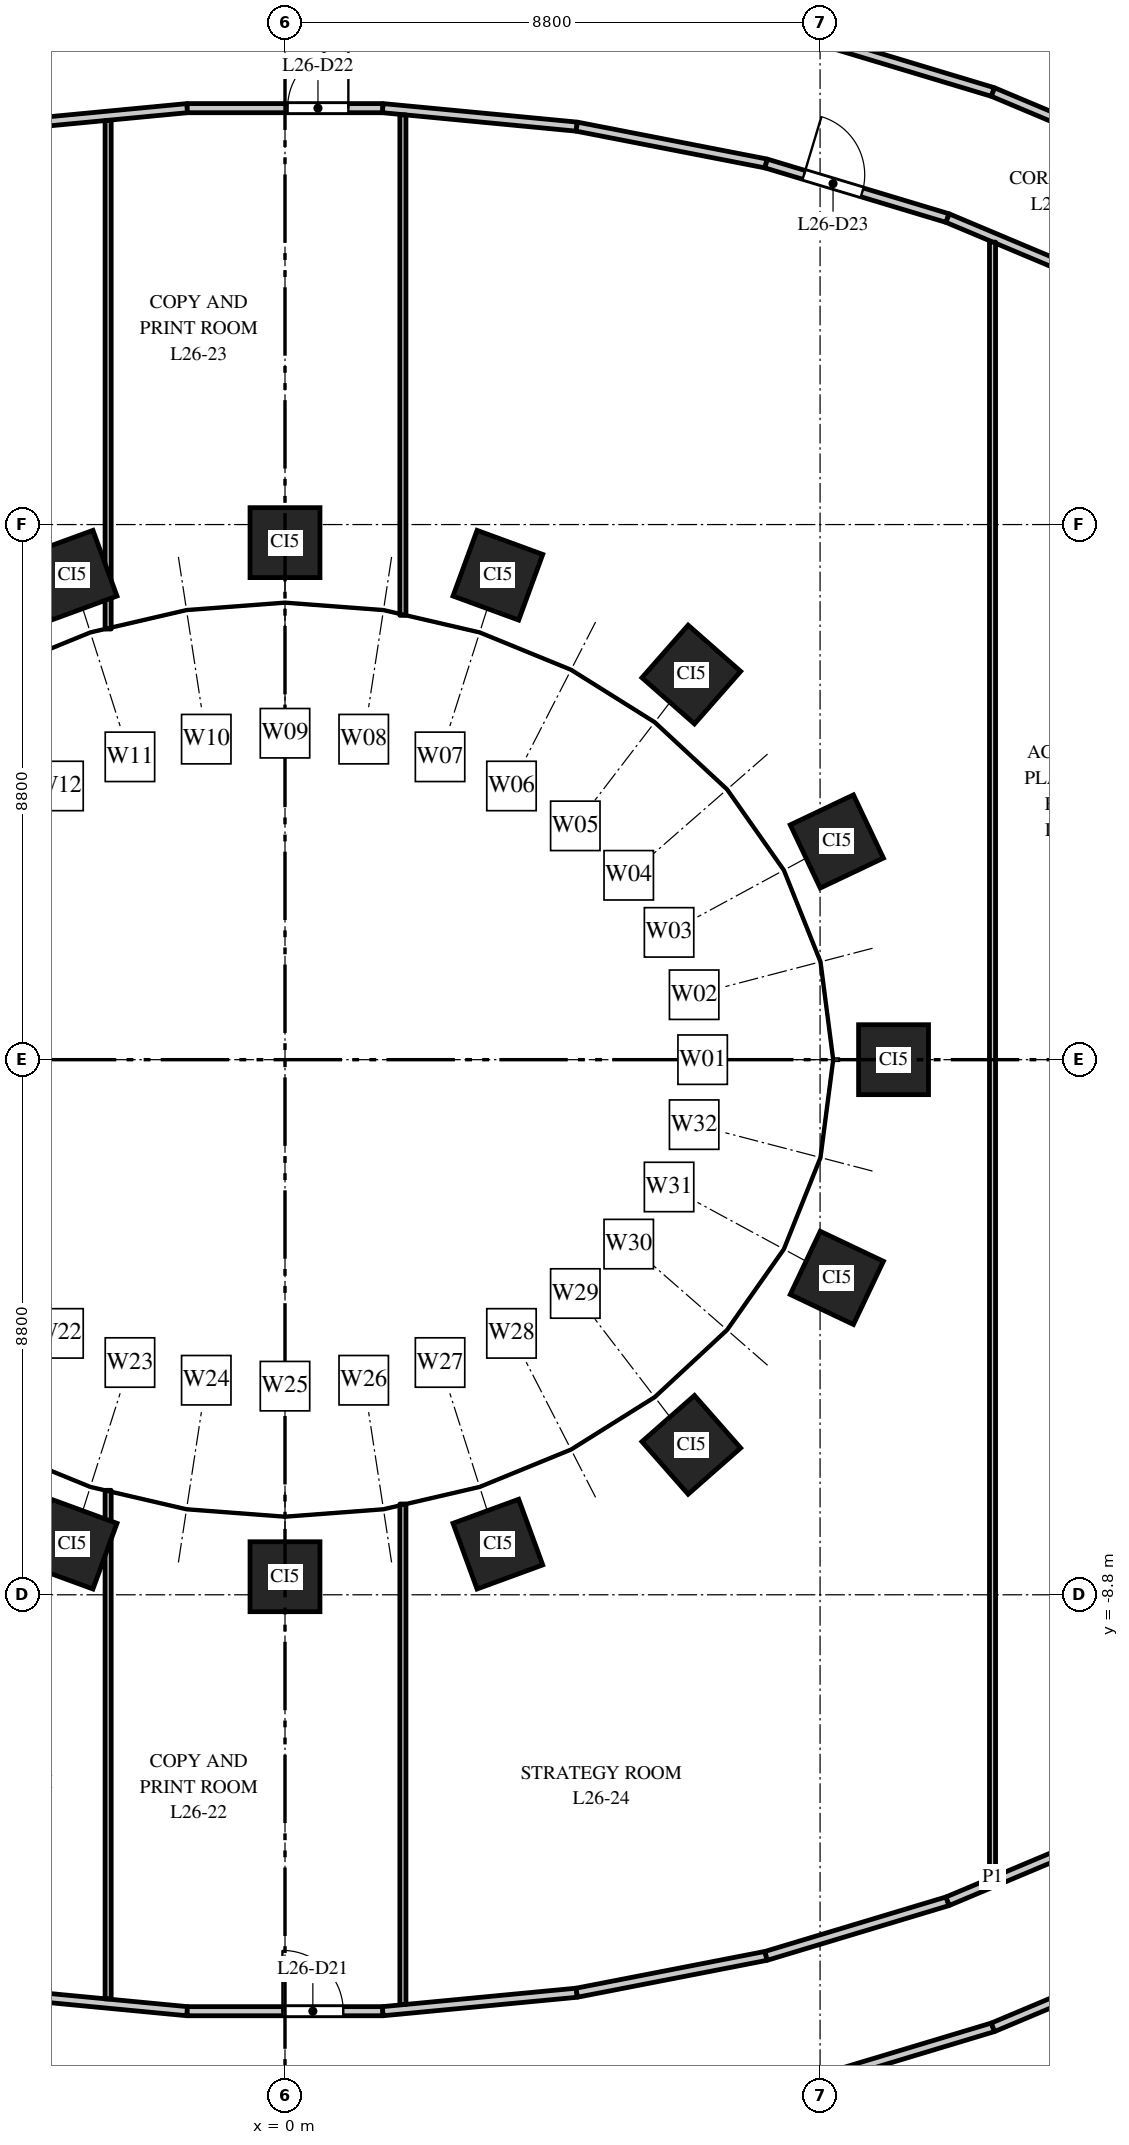
"""IFC4 building model, lengths in metres.
Left out: names, types, materials, properties, quantities, classifications, styles, units other than length and angle.
Written with IfcOpenShell. Run it as: python <this file> out.ifc"""

import sys

from ifc_helpers import new_model, si_unit, direction, frame, frame_2d, origin, origin_2d, place, context, subcontext, project, spatial, rectangle, extrude, element, fill, save


model = new_model("IFC4")
c1 = context("Model", 3, precision=1e-05, world=origin(), true_north=direction((0.0, 1.0)))
c2 = subcontext(c1, "Body", "Model", "MODEL_VIEW")
j1 = project(units=[si_unit("LENGTHUNIT", "METRE"), si_unit("PLANEANGLEUNIT", "RADIAN")], contexts=[c1])
p1 = place(None, origin())
s1 = spatial("IfcSite", under=j1, at=p1, CompositionType="ELEMENT")
p2 = place(p1, origin())
s2 = spatial("IfcBuilding", under=s1, at=p2, CompositionType="ELEMENT")
p3 = place(p2, frame((0.0, 0.0, 116.0)))
s3 = spatial("IfcBuildingStorey", under=s2, at=p3, CompositionType="ELEMENT", Elevation=116.0)
for number, where, z_axis, x_axis in (
    (1, (10.008, 0.0, 0.0), (0.0, 0.0, 1.0), (0.0, 1.0, 0.0)),
    (2, (9.076, 3.588, 0.0), (0.0, 0.0, 1.0), (-0.429, 0.903, 0.0)),
    (3, (6.682, 6.334, 0.0), (0.0, 0.0, 1.0), (-0.751, 0.66, 0.0)),
    (4, (3.501, 7.967, 0.0), (0.0, 0.0, 1.0), (-0.939, 0.344, 0.0)),
    (5, (0.0, 8.503, 0.0), (0.0, 0.0, 1.0), (-1.0, 0.0, 0.0)),
    (6, (-3.501, 7.967, 0.0), (0.0, 0.0, 1.0), (-0.939, -0.344, 0.0)),
    (7, (-3.501, -7.967, 0.0), (0.0, 0.0, 1.0), (0.939, -0.344, 0.0)),
    (8, (0.0, -8.503, 0.0), (0.0, 0.0, 1.0), (1.0, 0.0, 0.0)),
    (9, (3.501, -7.967, 0.0), (0.0, 0.0, 1.0), (0.939, 0.344, 0.0)),
    (10, (6.682, -6.334, 0.0), (0.0, 0.0, 1.0), (0.751, 0.66, 0.0)),
    (11, (9.076, -3.588, 0.0), (0.0, 0.0, 1.0), (0.429, 0.903, 0.0)),
):
    element("IfcColumn", number, at=place(p3, frame(where, z_axis=z_axis, x_axis=x_axis)), inside=s3, PredefinedType="COLUMN", context=c2, shape_type="SweptSolid", body=[
        extrude(rectangle(XDim=1.15, YDim=1.15, at=origin_2d()), origin(), (0.0, 0.0, 1.0), 4.0),
    ])
for number, where, z_axis, x_axis in (
    (12, (-4.798, -15.344, 0.0), (0.0, 0.0, 1.0), (0.995, -0.095, 0.0)),
    (13, (-4.798, 15.344, 0.0), (0.0, 0.0, 1.0), (0.995, 0.095, 0.0)),
):
    element("IfcWall", number, at=place(p3, frame(where, z_axis=z_axis, x_axis=x_axis)), inside=s3, PredefinedType="PARTITIONING", context=c2, shape_type="SweptSolid", body=[
        extrude(rectangle(XDim=3.205, YDim=0.15, at=frame_2d((1.602, 0.0))), origin(), (0.0, 0.0, 1.0), 3.7),
    ])
for number, where, z_axis, x_axis in (
    (14, (-2.909, -15.445, 0.0), (0.0, 0.0, 1.0), (0.0, 1.0, 0.0)),
    (15, (-2.909, 7.082, 0.0), (0.0, 0.0, 1.0), (0.0, 1.0, 0.0)),
):
    element("IfcWall", number, at=place(p3, frame(where, z_axis=z_axis, x_axis=x_axis)), inside=s3, PredefinedType="PARTITIONING", context=c2, shape_type="SweptSolid", body=[
        extrude(rectangle(XDim=8.363, YDim=0.1, at=frame_2d((4.182, 0.0))), origin(), (0.0, 0.0, 1.0), 2.9),
    ])
p4 = place(p3, frame((-1.608, -15.648, 0.0), z_axis=(0.0, 0.0, 1.0), x_axis=(1.0, 0.0, 0.0)))
e16 = element("IfcWall", 16, at=p4, inside=s3, PredefinedType="PARTITIONING", context=c2, shape_type="SweptSolid", body=[
    extrude(rectangle(XDim=3.216, YDim=0.15, at=frame_2d((1.608, 0.0))), origin(), (0.0, 0.0, 1.0), 2.85),
])
p5 = place(p4, frame((1.566, 0.0, 0.0)))
e17 = element("IfcOpeningElement", 17, at=p5, cuts=e16, PredefinedType="OPENING", context=c2, shape_type="SweptSolid", body=[
    extrude(rectangle(XDim=1.0, YDim=2.1, at=frame_2d((0.5, 1.05))), frame((0.0, 0.085, 0.0), z_axis=(0.0, -1.0, 0.0), x_axis=(1.0, 0.0, 0.0)), (0.0, 0.0, 1.0), 0.17),
])
p6 = place(p3, frame((-1.608, 15.648, 0.0), z_axis=(0.0, 0.0, 1.0), x_axis=(1.0, 0.0, 0.0)))
e18 = element("IfcWall", 18, at=p6, inside=s3, PredefinedType="PARTITIONING", context=c2, shape_type="SweptSolid", body=[
    extrude(rectangle(XDim=3.216, YDim=0.15, at=frame_2d((1.608, 0.0))), origin(), (0.0, 0.0, 1.0), 2.85),
])
p7 = place(p6, frame((1.65, 0.0, 0.0)))
e19 = element("IfcOpeningElement", 19, at=p7, cuts=e18, PredefinedType="OPENING", context=c2, shape_type="SweptSolid", body=[
    extrude(rectangle(XDim=1.0, YDim=2.1, at=frame_2d((0.5, 1.05))), frame((0.0, 0.085, 0.0), z_axis=(0.0, -1.0, 0.0), x_axis=(1.0, 0.0, 0.0)), (0.0, 0.0, 1.0), 0.17),
])
for number, where, z_axis, x_axis in (
    (20, (1.608, -15.648, 0.0), (0.0, 0.0, 1.0), (0.995, 0.095, 0.0)),
    (21, (1.608, 15.648, 0.0), (0.0, 0.0, 1.0), (0.995, -0.095, 0.0)),
):
    element("IfcWall", number, at=place(p3, frame(where, z_axis=z_axis, x_axis=x_axis)), inside=s3, PredefinedType="PARTITIONING", context=c2, shape_type="SweptSolid", body=[
        extrude(rectangle(XDim=3.205, YDim=0.15, at=frame_2d((1.602, 0.0))), origin(), (0.0, 0.0, 1.0), 2.85),
    ])
for number, where, z_axis, x_axis in (
    (22, (1.939, -15.537, 0.0), (0.0, 0.0, 1.0), (0.0, 1.0, 0.0)),
    (23, (1.939, 7.307, 0.0), (0.0, 0.0, 1.0), (0.0, 1.0, 0.0)),
):
    element("IfcWall", number, at=place(p3, frame(where, z_axis=z_axis, x_axis=x_axis)), inside=s3, PredefinedType="PARTITIONING", context=c2, shape_type="SweptSolid", body=[
        extrude(rectangle(XDim=8.23, YDim=0.1, at=frame_2d((4.115, 0.0))), origin(), (0.0, 0.0, 1.0), 2.85),
    ])
for number, where, z_axis, x_axis in (
    (24, (4.798, -15.344, 0.0), (0.0, 0.0, 1.0), (0.982, 0.191, 0.0)),
    (25, (4.798, 15.344, 0.0), (0.0, 0.0, 1.0), (0.982, -0.191, 0.0)),
):
    element("IfcWall", number, at=place(p3, frame(where, z_axis=z_axis, x_axis=x_axis)), inside=s3, PredefinedType="PARTITIONING", context=c2, shape_type="SweptSolid", body=[
        extrude(rectangle(XDim=3.172, YDim=0.15, at=frame_2d((1.586, 0.0))), origin(), (0.0, 0.0, 1.0), 3.7),
    ])
p8 = place(p3, frame((7.912, -14.738, 0.0), z_axis=(0.0, 0.0, 1.0), x_axis=(0.957606118849, 0.28808075455, 0.0)))
e26 = element("IfcWall", 26, at=p8, inside=s3, PredefinedType="PARTITIONING", context=c2, shape_type="SweptSolid", body=[
    extrude(rectangle(XDim=3.117, YDim=0.15, at=frame_2d((1.559, 0.0))), origin(), (0.0, 0.0, 1.0), 2.85),
])
p9 = place(p3, frame((7.912, 14.738, 0.0), z_axis=(0.0, 0.0, 1.0), x_axis=(0.957606118849, -0.28808075455, 0.0)))
e27 = element("IfcWall", 27, at=p9, inside=s3, PredefinedType="PARTITIONING", context=c2, shape_type="SweptSolid", body=[
    extrude(rectangle(XDim=3.117, YDim=0.15, at=frame_2d((1.559, 0.0))), origin(), (0.0, 0.0, 1.0), 2.85),
])
p10 = place(p9, frame((0.65, 0.0, 0.0)))
e28 = element("IfcOpeningElement", 28, at=p10, cuts=e27, PredefinedType="OPENING", context=c2, shape_type="SweptSolid", body=[
    extrude(rectangle(XDim=1.0, YDim=2.1, at=frame_2d((0.5, 1.05))), frame((0.0, 0.085, 0.0), z_axis=(0.0, -1.0, 0.0), x_axis=(1.0, 0.0, 0.0)), (0.0, 0.0, 1.0), 0.17),
])
for number, where, z_axis, x_axis in (
    (29, (8.44, -16.877, 0.0), (0.0, 0.0, 1.0), (0.958, 0.288, 0.0)),
    (30, (8.44, 16.877, 0.0), (0.0, 0.0, 1.0), (0.958, -0.288, 0.0)),
):
    element("IfcWall", number, at=place(p3, frame(where, z_axis=z_axis, x_axis=x_axis)), inside=s3, PredefinedType="PARTITIONING", context=c2, shape_type="SweptSolid", body=[
        extrude(rectangle(XDim=3.345, YDim=0.15, at=frame_2d((1.672, 0.0))), origin(), (0.0, 0.0, 1.0), 2.85),
    ])
for number, where, z_axis, x_axis in (
    (31, (10.897, -13.84, 0.0), (0.0, 0.0, 1.0), (0.922, 0.388, 0.0)),
    (32, (10.897, 13.84, 0.0), (0.0, 0.0, 1.0), (0.922, -0.388, 0.0)),
):
    element("IfcWall", number, at=place(p3, frame(where, z_axis=z_axis, x_axis=x_axis)), inside=s3, PredefinedType="PARTITIONING", context=c2, shape_type="SweptSolid", body=[
        extrude(rectangle(XDim=3.038, YDim=0.15, at=frame_2d((1.519, 0.0))), origin(), (0.0, 0.0, 1.0), 3.7),
    ])
p11 = place(p3, frame((11.636, -13.444, 0.0), z_axis=(0.0, 0.0, 1.0), x_axis=(0.0, 1.0, 0.0)))
e33 = element("IfcWall", 33, at=p11, inside=s3, PredefinedType="PARTITIONING", context=c2, shape_type="SweptSolid", body=[
    extrude(rectangle(XDim=26.888, YDim=0.1, at=frame_2d((13.444, 0.0))), origin(), (0.0, 0.0, 1.0), 2.75),
])
p12 = place(p3, frame((11.643, -15.913, 0.0), z_axis=(0.0, 0.0, 1.0), x_axis=(0.921789499058, 0.38769075231, 0.0)))
e34 = element("IfcWall", 34, at=p12, inside=s3, PredefinedType="PARTITIONING", context=c2, shape_type="SweptSolid", body=[
    extrude(rectangle(XDim=3.278, YDim=0.15, at=frame_2d((1.639, 0.0))), origin(), (0.0, 0.0, 1.0), 3.7),
])
p13 = place(p12, frame((1.65, 0.0, 0.0)))
e35 = element("IfcOpeningElement", 35, at=p13, cuts=e34, PredefinedType="OPENING", context=c2, shape_type="SweptSolid", body=[
    extrude(rectangle(XDim=1.0, YDim=2.1, at=frame_2d((0.5, 1.05))), frame((0.0, 0.085, 0.0), z_axis=(0.0, -1.0, 0.0), x_axis=(1.0, 0.0, 0.0)), (0.0, 0.0, 1.0), 0.17),
])
p14 = place(p3, frame((11.643, 15.913, 0.0), z_axis=(0.0, 0.0, 1.0), x_axis=(0.921789499058, -0.38769075231, 0.0)))
e36 = element("IfcWall", 36, at=p14, inside=s3, PredefinedType="PARTITIONING", context=c2, shape_type="SweptSolid", body=[
    extrude(rectangle(XDim=3.278, YDim=0.15, at=frame_2d((1.639, 0.0))), origin(), (0.0, 0.0, 1.0), 3.7),
])
p15 = place(p5, origin())
e37 = element("IfcDoor", 37, at=p15, inside=s3, OperationType="SINGLE_SWING_LEFT", PredefinedType="DOOR", context=c2, shape_type="SweptSolid", body=[
    extrude(rectangle(XDim=1.0, YDim=2.1, at=frame_2d((0.5, 1.05))), frame((0.0, 0.025, 0.0), z_axis=(0.0, -1.0, 0.0), x_axis=(1.0, 0.0, 0.0)), (0.0, 0.0, 1.0), 0.05),
])
fill(e17, e37)
p16 = place(p7, origin())
e38 = element("IfcDoor", 38, at=p16, inside=s3, OperationType="SINGLE_SWING_RIGHT", PredefinedType="DOOR", context=c2, shape_type="SweptSolid", body=[
    extrude(rectangle(XDim=1.0, YDim=2.1, at=frame_2d((0.5, 1.05))), frame((0.0, 0.025, 0.0), z_axis=(0.0, -1.0, 0.0), x_axis=(1.0, 0.0, 0.0)), (0.0, 0.0, 1.0), 0.05),
])
fill(e19, e38)
p17 = place(p10, origin())
e39 = element("IfcDoor", 39, at=p17, inside=s3, OperationType="SINGLE_SWING_LEFT", PredefinedType="DOOR", context=c2, shape_type="SweptSolid", body=[
    extrude(rectangle(XDim=1.0, YDim=2.1, at=frame_2d((0.5, 1.05))), frame((0.0, 0.025, 0.0), z_axis=(0.0, -1.0, 0.0), x_axis=(1.0, 0.0, 0.0)), (0.0, 0.0, 1.0), 0.05),
])
fill(e28, e39)
save(model, sys.argv[1])
